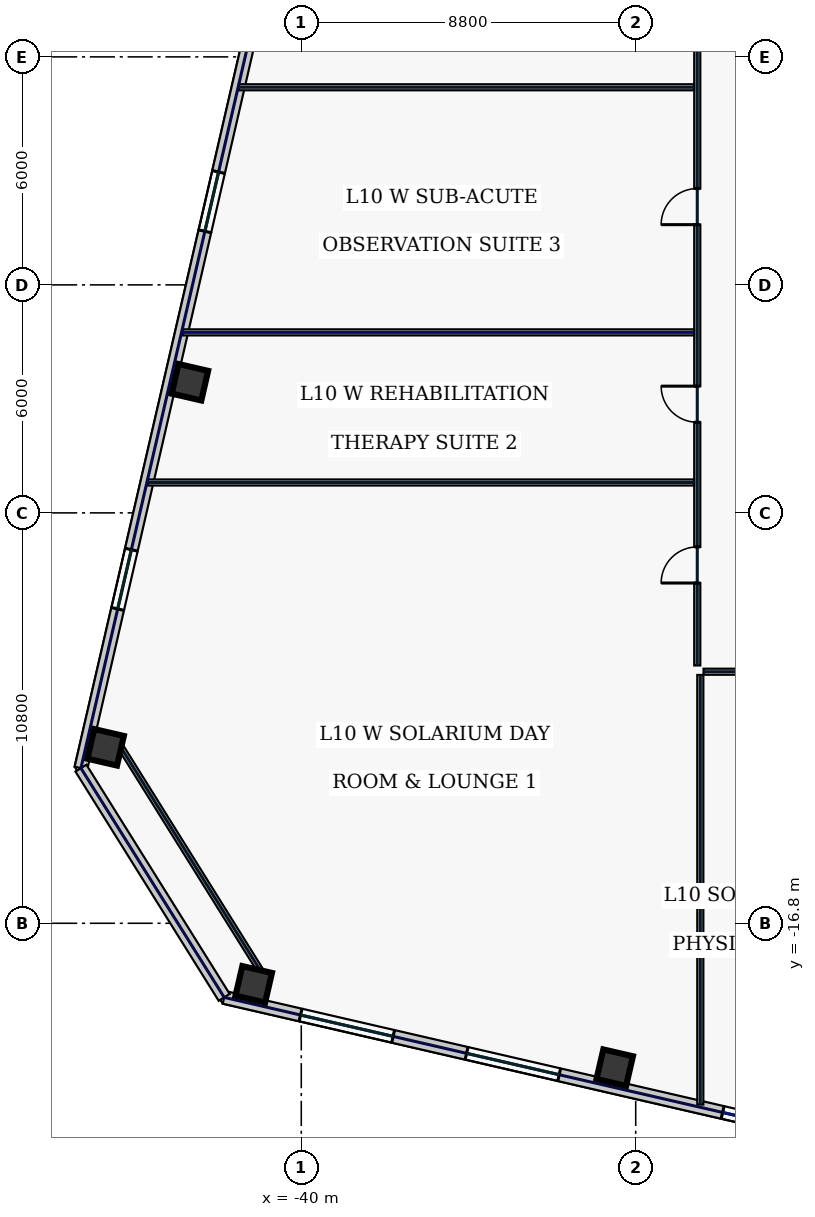
"""IFC4 building model, lengths in metres.
Left out: names, types, materials, properties, quantities, classifications, styles, units other than length and angle.
Written with IfcOpenShell. Run it as: python <this file> out.ifc"""

import sys

from ifc_helpers import new_model, si_unit, direction, frame, frame_2d, origin, origin_2d, place, context, subcontext, project, spatial, rectangle, hollow_rectangle, extrude, element, fill, save


model = new_model("IFC4")
c1 = context("Model", 3, precision=1e-05, world=origin(), true_north=direction((0.0, 1.0)))
c2 = subcontext(c1, "Body", "Model", "MODEL_VIEW")
j1 = project(units=[si_unit("LENGTHUNIT", "METRE"), si_unit("PLANEANGLEUNIT", "RADIAN")], contexts=[c1])
p1 = place(None, origin())
s1 = spatial("IfcSite", under=j1, at=p1, CompositionType="ELEMENT")
p2 = place(p1, origin())
s2 = spatial("IfcBuilding", under=s1, at=p2, CompositionType="ELEMENT")
p3 = place(p2, frame((0.0, 0.0, 51.4)))
s3 = spatial("IfcBuildingStorey", under=s2, at=p3, CompositionType="ELEMENT", Elevation=51.4)
for number, where, z_axis, x_axis in (
    (1, (-41.251, -18.406, 0.0), (0.0, 0.0, 1.0), (0.974, -0.225, 0.0)),
    (2, (-31.752, -20.599, 0.0), (0.0, 0.0, 1.0), (0.974, -0.225, 0.0)),
    (3, (-42.93, -2.562, 0.0), (0.0, 0.0, 1.0), (0.974, -0.225, 0.0)),
    (4, (-45.148, -12.169, 0.0), (0.0, 0.0, 1.0), (0.974, -0.225, 0.0)),
):
    element("IfcColumn", number, at=place(p3, frame(where, z_axis=z_axis, x_axis=x_axis)), inside=s3, PredefinedType="COLUMN", context=c2, shape_type="SweptSolid", body=[
        extrude(hollow_rectangle(XDim=0.8, YDim=0.8, WallThickness=0.036, at=origin_2d()), origin(), (0.0, 0.0, 1.0), 3.74),
    ])
p4 = place(p3, frame((-42.029, -18.75, 0.0), z_axis=(0.0, 0.0, 1.0), x_axis=(0.974371399361, -0.224945273581, 0.0)))
e5 = element("IfcWall", 5, at=p4, inside=s3, PredefinedType="STANDARD", context=c2, shape_type="SweptSolid", body=[
    extrude(rectangle(XDim=19.75, YDim=0.34, at=frame_2d((9.875, 0.0))), origin(), (0.0, 0.0, 1.0), 3.74),
])
p5 = place(p4, frame((2.062, 0.0, 0.72)))
e6 = element("IfcOpeningElement", 6, at=p5, cuts=e5, PredefinedType="OPENING", context=c2, shape_type="SweptSolid", body=[
    extrude(rectangle(XDim=2.5, YDim=2.15, at=frame_2d((1.25, 1.075))), frame((0.0, 0.18, 0.0), z_axis=(0.0, -1.0, 0.0), x_axis=(1.0, 0.0, 0.0)), (0.0, 0.0, 1.0), 0.36),
])
p6 = place(p4, frame((6.546, 0.0, 0.72)))
e7 = element("IfcOpeningElement", 7, at=p6, cuts=e5, PredefinedType="OPENING", context=c2, shape_type="SweptSolid", body=[
    extrude(rectangle(XDim=2.5, YDim=2.15, at=frame_2d((1.25, 1.075))), frame((0.0, 0.18, 0.0), z_axis=(0.0, -1.0, 0.0), x_axis=(1.0, 0.0, 0.0)), (0.0, 0.0, 1.0), 0.36),
])
p7 = place(p4, frame((13.461, 0.0, 0.72)))
e8 = element("IfcOpeningElement", 8, at=p7, cuts=e5, PredefinedType="OPENING", context=c2, shape_type="SweptSolid", body=[
    extrude(rectangle(XDim=0.85, YDim=1.85, at=frame_2d((0.425, 0.925))), frame((0.0, 0.18, 0.0), z_axis=(0.0, -1.0, 0.0), x_axis=(1.0, 0.0, 0.0)), (0.0, 0.0, 1.0), 0.36),
])
p8 = place(p3, frame((-36.62, 27.037, 0.0), z_axis=(0.0, 0.0, 1.0), x_axis=(-0.224951280646, -0.974370012539, 0.0)))
e9 = element("IfcWall", 9, at=p8, inside=s3, PredefinedType="STANDARD", context=c2, shape_type="SweptSolid", body=[
    extrude(rectangle(XDim=40.8, YDim=0.34, at=frame_2d((20.4, 0.0))), origin(), (0.0, 0.0, 1.0), 3.74),
])
p9 = place(p8, frame((4.3, 0.0, 0.58)))
e10 = element("IfcOpeningElement", 10, at=p9, cuts=e9, PredefinedType="OPENING", context=c2, shape_type="SweptSolid", body=[
    extrude(rectangle(XDim=1.6, YDim=2.3, at=frame_2d((0.8, 1.15))), frame((0.0, 0.18, 0.0), z_axis=(0.0, -1.0, 0.0), x_axis=(1.0, 0.0, 0.0)), (0.0, 0.0, 1.0), 0.36),
])
p10 = place(p8, frame((14.5, 0.0, 0.58)))
e11 = element("IfcOpeningElement", 11, at=p10, cuts=e9, PredefinedType="OPENING", context=c2, shape_type="SweptSolid", body=[
    extrude(rectangle(XDim=1.6, YDim=2.3, at=frame_2d((0.8, 1.15))), frame((0.0, 0.18, 0.0), z_axis=(0.0, -1.0, 0.0), x_axis=(1.0, 0.0, 0.0)), (0.0, 0.0, 1.0), 0.36),
])
p11 = place(p8, frame((24.7, 0.0, 0.58)))
e12 = element("IfcOpeningElement", 12, at=p11, cuts=e9, PredefinedType="OPENING", context=c2, shape_type="SweptSolid", body=[
    extrude(rectangle(XDim=1.6, YDim=2.3, at=frame_2d((0.8, 1.15))), frame((0.0, 0.18, 0.0), z_axis=(0.0, -1.0, 0.0), x_axis=(1.0, 0.0, 0.0)), (0.0, 0.0, 1.0), 0.36),
])
p12 = place(p8, frame((34.9, 0.0, 0.58)))
e13 = element("IfcOpeningElement", 13, at=p12, cuts=e9, PredefinedType="OPENING", context=c2, shape_type="SweptSolid", body=[
    extrude(rectangle(XDim=1.6, YDim=2.3, at=frame_2d((0.8, 1.15))), frame((0.0, 0.18, 0.0), z_axis=(0.0, -1.0, 0.0), x_axis=(1.0, 0.0, 0.0)), (0.0, 0.0, 1.0), 0.36),
])
p13 = place(p3, frame((-45.798, -12.717, 0.0), z_axis=(0.0, 0.0, 1.0), x_axis=(0.529906387556, -0.848056142261, 0.0)))
e14 = element("IfcWall", 14, at=p13, inside=s3, PredefinedType="STANDARD", context=c2, shape_type="SweptSolid", body=[
    extrude(rectangle(XDim=7.114, YDim=0.34, at=frame_2d((3.557, 0.0))), origin(), (0.0, 0.0, 1.0), 3.74),
])
p14 = place(p3, frame((-44.86, -11.989, 0.0), z_axis=(0.0, 0.0, 1.0), x_axis=(0.52991239767, -0.848052386823, 0.0)))
e15 = element("IfcWall", 15, at=p14, inside=s3, PredefinedType="PARTITIONING", context=c2, shape_type="SweptSolid", body=[
    extrude(rectangle(XDim=7.354, YDim=0.16, at=frame_2d((3.677, 0.0))), origin(), (0.0, 0.0, 1.0), 3.74),
])
p15 = place(p3, frame((-29.58, -10.015, 0.0), z_axis=(0.0, 0.0, 1.0), x_axis=(0.0, 1.0, 0.0)))
e16 = element("IfcWall", 16, at=p15, inside=s3, PredefinedType="PARTITIONING", context=c2, shape_type="SweptSolid", body=[
    extrude(rectangle(XDim=20.13, YDim=0.16, at=frame_2d((10.065, 0.0))), origin(), (0.0, 0.0, 1.0), 3.74),
])
p16 = place(p15, frame((2.169, 0.0, 0.0)))
e17 = element("IfcOpeningElement", 17, at=p16, cuts=e16, PredefinedType="OPENING", context=c2, shape_type="SweptSolid", body=[
    extrude(rectangle(XDim=0.95, YDim=2.2, at=frame_2d((0.475, 1.1))), frame((0.0, 0.09, 0.0), z_axis=(0.0, -1.0, 0.0), x_axis=(1.0, 0.0, 0.0)), (0.0, 0.0, 1.0), 0.18),
])
p17 = place(p15, frame((6.4, 0.0, 0.0)))
e18 = element("IfcOpeningElement", 18, at=p17, cuts=e16, PredefinedType="OPENING", context=c2, shape_type="SweptSolid", body=[
    extrude(rectangle(XDim=0.95, YDim=2.2, at=frame_2d((0.475, 1.1))), frame((0.0, 0.09, 0.0), z_axis=(0.0, -1.0, 0.0), x_axis=(1.0, 0.0, 0.0)), (0.0, 0.0, 1.0), 0.18),
])
p18 = place(p15, frame((11.6, 0.0, 0.0)))
e19 = element("IfcOpeningElement", 19, at=p18, cuts=e16, PredefinedType="OPENING", context=c2, shape_type="SweptSolid", body=[
    extrude(rectangle(XDim=0.95, YDim=2.2, at=frame_2d((0.475, 1.1))), frame((0.0, 0.09, 0.0), z_axis=(0.0, -1.0, 0.0), x_axis=(1.0, 0.0, 0.0)), (0.0, 0.0, 1.0), 0.18),
])
p19 = place(p15, frame((17.131, 0.0, 0.0)))
e20 = element("IfcOpeningElement", 20, at=p19, cuts=e16, PredefinedType="OPENING", context=c2, shape_type="SweptSolid", body=[
    extrude(rectangle(XDim=0.95, YDim=2.2, at=frame_2d((0.475, 1.1))), frame((0.0, 0.09, 0.0), z_axis=(0.0, -1.0, 0.0), x_axis=(1.0, 0.0, 0.0)), (0.0, 0.0, 1.0), 0.18),
])
p20 = place(p3, frame((29.415, -10.18, 0.0), z_axis=(0.0, 0.0, 1.0), x_axis=(-1.0, 0.0, 0.0)))
e21 = element("IfcWall", 21, at=p20, inside=s3, PredefinedType="PARTITIONING", context=c2, shape_type="SweptSolid", body=[
    extrude(rectangle(XDim=58.83, YDim=0.16, at=frame_2d((29.415, 0.0))), origin(), (0.0, 0.0, 1.0), 3.74),
])
p21 = place(p20, frame((56.006, 0.0, 0.0)))
e22 = element("IfcOpeningElement", 22, at=p21, cuts=e21, PredefinedType="OPENING", context=c2, shape_type="SweptSolid", body=[
    extrude(rectangle(XDim=1.05, YDim=2.2, at=frame_2d((0.525, 1.1))), frame((0.0, 0.09, 0.0), z_axis=(0.0, -1.0, 0.0), x_axis=(1.0, 0.0, 0.0)), (0.0, 0.0, 1.0), 0.18),
])
p22 = place(p20, frame((50.719, 0.0, 0.0)))
e23 = element("IfcOpeningElement", 23, at=p22, cuts=e21, PredefinedType="OPENING", context=c2, shape_type="SweptSolid", body=[
    extrude(rectangle(XDim=1.3, YDim=2.2, at=frame_2d((0.65, 1.1))), frame((0.0, 0.09, 0.0), z_axis=(0.0, -1.0, 0.0), x_axis=(1.0, 0.0, 0.0)), (0.0, 0.0, 1.0), 0.18),
])
p23 = place(p20, frame((45.208, 0.0, 0.0)))
e24 = element("IfcOpeningElement", 24, at=p23, cuts=e21, PredefinedType="OPENING", context=c2, shape_type="SweptSolid", body=[
    extrude(rectangle(XDim=1.3, YDim=2.2, at=frame_2d((0.65, 1.1))), frame((0.0, 0.09, 0.0), z_axis=(0.0, -1.0, 0.0), x_axis=(1.0, 0.0, 0.0)), (0.0, 0.0, 1.0), 0.18),
])
p24 = place(p20, frame((38.239, 0.0, 0.0)))
e25 = element("IfcOpeningElement", 25, at=p24, cuts=e21, PredefinedType="OPENING", context=c2, shape_type="SweptSolid", body=[
    extrude(rectangle(XDim=0.95, YDim=2.2, at=frame_2d((0.475, 1.1))), frame((0.0, 0.09, 0.0), z_axis=(0.0, -1.0, 0.0), x_axis=(1.0, 0.0, 0.0)), (0.0, 0.0, 1.0), 0.18),
])
p25 = place(p20, frame((30.55, 0.0, 0.0)))
e26 = element("IfcOpeningElement", 26, at=p25, cuts=e21, PredefinedType="OPENING", context=c2, shape_type="SweptSolid", body=[
    extrude(rectangle(XDim=0.95, YDim=2.2, at=frame_2d((0.475, 1.1))), frame((0.0, 0.09, 0.0), z_axis=(0.0, -1.0, 0.0), x_axis=(1.0, 0.0, 0.0)), (0.0, 0.0, 1.0), 0.18),
])
p26 = place(p20, frame((24.85, 0.0, 0.0)))
e27 = element("IfcOpeningElement", 27, at=p26, cuts=e21, PredefinedType="OPENING", context=c2, shape_type="SweptSolid", body=[
    extrude(rectangle(XDim=1.05, YDim=2.2, at=frame_2d((0.525, 1.1))), frame((0.0, 0.09, 0.0), z_axis=(0.0, -1.0, 0.0), x_axis=(1.0, 0.0, 0.0)), (0.0, 0.0, 1.0), 0.18),
])
p27 = place(p20, frame((19.4, 0.0, 0.0)))
e28 = element("IfcOpeningElement", 28, at=p27, cuts=e21, PredefinedType="OPENING", context=c2, shape_type="SweptSolid", body=[
    extrude(rectangle(XDim=0.95, YDim=2.2, at=frame_2d((0.475, 1.1))), frame((0.0, 0.09, 0.0), z_axis=(0.0, -1.0, 0.0), x_axis=(1.0, 0.0, 0.0)), (0.0, 0.0, 1.0), 0.18),
])
p28 = place(p20, frame((14.2, 0.0, 0.0)))
e29 = element("IfcOpeningElement", 29, at=p28, cuts=e21, PredefinedType="OPENING", context=c2, shape_type="SweptSolid", body=[
    extrude(rectangle(XDim=0.95, YDim=2.2, at=frame_2d((0.475, 1.1))), frame((0.0, 0.09, 0.0), z_axis=(0.0, -1.0, 0.0), x_axis=(1.0, 0.0, 0.0)), (0.0, 0.0, 1.0), 0.18),
])
p29 = place(p20, frame((9.7, 0.0, 0.0)))
e30 = element("IfcOpeningElement", 30, at=p29, cuts=e21, PredefinedType="OPENING", context=c2, shape_type="SweptSolid", body=[
    extrude(rectangle(XDim=0.95, YDim=2.2, at=frame_2d((0.475, 1.1))), frame((0.0, 0.09, 0.0), z_axis=(0.0, -1.0, 0.0), x_axis=(1.0, 0.0, 0.0)), (0.0, 0.0, 1.0), 0.18),
])
p30 = place(p20, frame((5.725, 0.0, 0.0)))
e31 = element("IfcOpeningElement", 31, at=p30, cuts=e21, PredefinedType="OPENING", context=c2, shape_type="SweptSolid", body=[
    extrude(rectangle(XDim=1.3, YDim=2.2, at=frame_2d((0.65, 1.1))), frame((0.0, 0.09, 0.0), z_axis=(0.0, -1.0, 0.0), x_axis=(1.0, 0.0, 0.0)), (0.0, 0.0, 1.0), 0.18),
])
p31 = place(p20, frame((1.894, 0.0, 0.0)))
e32 = element("IfcOpeningElement", 32, at=p31, cuts=e21, PredefinedType="OPENING", context=c2, shape_type="SweptSolid", body=[
    extrude(rectangle(XDim=1.3, YDim=2.2, at=frame_2d((0.65, 1.1))), frame((0.0, 0.09, 0.0), z_axis=(0.0, -1.0, 0.0), x_axis=(1.0, 0.0, 0.0)), (0.0, 0.0, 1.0), 0.18),
])
p32 = place(p3, frame((-29.5, -21.571, 0.0), z_axis=(0.0, 0.0, 1.0), x_axis=(0.0, 1.0, 0.0)))
e33 = element("IfcWall", 33, at=p32, inside=s3, PredefinedType="PARTITIONING", context=c2, shape_type="SweptSolid", body=[
    extrude(rectangle(XDim=11.306, YDim=0.16, at=frame_2d((5.653, 0.0))), origin(), (0.0, 0.0, 1.0), 3.74),
])
p33 = place(p3, frame((-44.042, -5.2, 0.0), z_axis=(0.0, 0.0, 1.0), x_axis=(1.0, 0.0, 0.0)))
e34 = element("IfcWall", 34, at=p33, inside=s3, PredefinedType="PARTITIONING", context=c2, shape_type="SweptSolid", body=[
    extrude(rectangle(XDim=14.377, YDim=0.16, at=frame_2d((7.188, 0.0))), origin(), (0.0, 0.0, 1.0), 3.74),
])
p34 = place(p3, frame((-43.13, -1.25, 0.0), z_axis=(0.0, 0.0, 1.0), x_axis=(1.0, 0.0, 0.0)))
e35 = element("IfcWall", 35, at=p34, inside=s3, PredefinedType="PARTITIONING", context=c2, shape_type="SweptSolid", body=[
    extrude(rectangle(XDim=13.465, YDim=0.16, at=frame_2d((6.732, 0.0))), origin(), (0.0, 0.0, 1.0), 3.235),
])
p35 = place(p3, frame((-41.641, 5.2, 0.0), z_axis=(0.0, 0.0, 1.0), x_axis=(1.0, 0.0, 0.0)))
e36 = element("IfcWall", 36, at=p35, inside=s3, PredefinedType="PARTITIONING", context=c2, shape_type="SweptSolid", body=[
    extrude(rectangle(XDim=11.976, YDim=0.16, at=frame_2d((5.988, 0.0))), origin(), (0.0, 0.0, 1.0), 3.74),
])
p36 = place(p5, origin())
e37 = element("IfcWindow", 37, at=p36, inside=s3, PartitioningType="SINGLE_PANEL", PredefinedType="WINDOW", context=c2, shape_type="SweptSolid", body=[
    extrude(rectangle(XDim=2.5, YDim=2.15, at=frame_2d((1.25, 1.075))), frame((0.0, 0.03, 0.0), z_axis=(0.0, -1.0, 0.0), x_axis=(1.0, 0.0, 0.0)), (0.0, 0.0, 1.0), 0.06),
])
fill(e6, e37)
p37 = place(p6, origin())
e38 = element("IfcWindow", 38, at=p37, inside=s3, PartitioningType="SINGLE_PANEL", PredefinedType="WINDOW", context=c2, shape_type="SweptSolid", body=[
    extrude(rectangle(XDim=2.5, YDim=2.15, at=frame_2d((1.25, 1.075))), frame((0.0, 0.03, 0.0), z_axis=(0.0, -1.0, 0.0), x_axis=(1.0, 0.0, 0.0)), (0.0, 0.0, 1.0), 0.06),
])
fill(e7, e38)
p38 = place(p7, origin())
e39 = element("IfcWindow", 39, at=p38, inside=s3, PartitioningType="SINGLE_PANEL", PredefinedType="WINDOW", context=c2, shape_type="SweptSolid", body=[
    extrude(rectangle(XDim=0.85, YDim=1.85, at=frame_2d((0.425, 0.925))), frame((0.0, 0.03, 0.0), z_axis=(0.0, -1.0, 0.0), x_axis=(1.0, 0.0, 0.0)), (0.0, 0.0, 1.0), 0.06),
])
fill(e8, e39)
p39 = place(p11, origin())
e40 = element("IfcWindow", 40, at=p39, inside=s3, PartitioningType="SINGLE_PANEL", PredefinedType="WINDOW", context=c2, shape_type="SweptSolid", body=[
    extrude(rectangle(XDim=1.6, YDim=2.3, at=frame_2d((0.8, 1.15))), frame((0.0, 0.03, 0.0), z_axis=(0.0, -1.0, 0.0), x_axis=(1.0, 0.0, 0.0)), (0.0, 0.0, 1.0), 0.06),
])
fill(e12, e40)
p40 = place(p12, origin())
e41 = element("IfcWindow", 41, at=p40, inside=s3, PartitioningType="SINGLE_PANEL", PredefinedType="WINDOW", context=c2, shape_type="SweptSolid", body=[
    extrude(rectangle(XDim=1.6, YDim=2.3, at=frame_2d((0.8, 1.15))), frame((0.0, 0.03, 0.0), z_axis=(0.0, -1.0, 0.0), x_axis=(1.0, 0.0, 0.0)), (0.0, 0.0, 1.0), 0.06),
])
fill(e13, e41)
p41 = place(p16, origin())
e42 = element("IfcDoor", 42, at=p41, inside=s3, OperationType="SINGLE_SWING_LEFT", PredefinedType="DOOR", context=c2, shape_type="SweptSolid", body=[
    extrude(rectangle(XDim=0.95, YDim=2.2, at=frame_2d((0.475, 1.1))), frame((0.0, 0.025, 0.0), z_axis=(0.0, -1.0, 0.0), x_axis=(1.0, 0.0, 0.0)), (0.0, 0.0, 1.0), 0.05),
])
fill(e17, e42)
p42 = place(p17, origin())
e43 = element("IfcDoor", 43, at=p42, inside=s3, OperationType="SINGLE_SWING_RIGHT", PredefinedType="DOOR", context=c2, shape_type="SweptSolid", body=[
    extrude(rectangle(XDim=0.95, YDim=2.2, at=frame_2d((0.475, 1.1))), frame((0.0, 0.025, 0.0), z_axis=(0.0, -1.0, 0.0), x_axis=(1.0, 0.0, 0.0)), (0.0, 0.0, 1.0), 0.05),
])
fill(e18, e43)
p43 = place(p18, origin())
e44 = element("IfcDoor", 44, at=p43, inside=s3, OperationType="SINGLE_SWING_LEFT", PredefinedType="DOOR", context=c2, shape_type="SweptSolid", body=[
    extrude(rectangle(XDim=0.95, YDim=2.2, at=frame_2d((0.475, 1.1))), frame((0.0, 0.025, 0.0), z_axis=(0.0, -1.0, 0.0), x_axis=(1.0, 0.0, 0.0)), (0.0, 0.0, 1.0), 0.05),
])
fill(e19, e44)
save(model, sys.argv[1])
